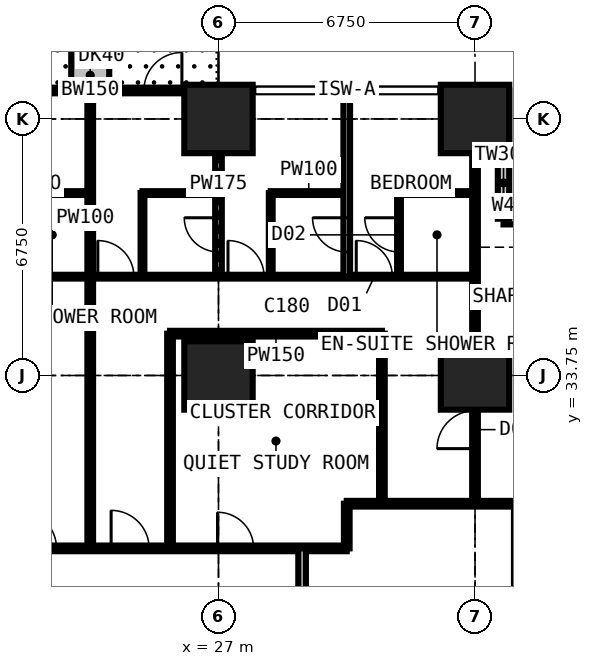
"""IFC4 building model, lengths in metres.
Left out: names, types, materials, properties, quantities, classifications, styles, units other than length and angle.
Written with IfcOpenShell. Run it as: python <this file> out.ifc"""

import sys

from ifc_helpers import new_model, si_unit, direction, frame, frame_2d, origin, origin_2d, place, context, subcontext, project, spatial, rectangle, extrude, element, fill, save


model = new_model("IFC4")
c1 = context("Model", 3, precision=1e-05, world=origin(), true_north=direction((0.0, 1.0)))
c2 = subcontext(c1, "Body", "Model", "MODEL_VIEW")
j1 = project(units=[si_unit("LENGTHUNIT", "METRE"), si_unit("PLANEANGLEUNIT", "RADIAN")], contexts=[c1])
p1 = place(None, origin())
s1 = spatial("IfcSite", under=j1, at=p1, CompositionType="ELEMENT")
p2 = place(p1, origin())
s2 = spatial("IfcBuilding", under=s1, at=p2, CompositionType="ELEMENT")
p3 = place(p2, frame((0.0, 0.0, 57.6)))
s3 = spatial("IfcBuildingStorey", under=s2, at=p3, CompositionType="ELEMENT", Elevation=57.6)
for number, where, z_axis, x_axis in (
    (1, (27.0, 33.75, 0.0), (0.0, 0.0, 1.0), (1.0, 0.0, 0.0)),
    (2, (27.0, 40.5, 0.0), (0.0, 0.0, 1.0), (1.0, 0.0, 0.0)),
    (3, (33.75, 33.75, 0.0), (0.0, 0.0, 1.0), (1.0, 0.0, 0.0)),
    (4, (33.75, 40.5, 0.0), (0.0, 0.0, 1.0), (1.0, 0.0, 0.0)),
):
    element("IfcColumn", number, at=place(p3, frame(where, z_axis=z_axis, x_axis=x_axis)), inside=s3, PredefinedType="COLUMN", context=c2, shape_type="SweptSolid", body=[
        extrude(rectangle(XDim=1.8, YDim=1.8, at=origin_2d()), origin(), (0.0, 0.0, 1.0), 3.6),
    ])
p4 = place(p3, frame((37.875, 37.875, 0.0), z_axis=(0.0, 0.0, 1.0), x_axis=(-1.0, 0.0, 0.0)))
e5 = element("IfcWall", 5, at=p4, inside=s3, PredefinedType="SOLIDWALL", context=c2, shape_type="SweptSolid", body=[
    extrude(rectangle(XDim=3.375, YDim=0.3, at=frame_2d((1.688, 0.0))), origin(), (0.0, 0.0, 1.0), 3.375),
])
p5 = place(p4, frame((0.788, 0.0, 0.6)))
e6 = element("IfcOpeningElement", 6, at=p5, cuts=e5, PredefinedType="OPENING", context=c2, shape_type="SweptSolid", body=[
    extrude(rectangle(XDim=1.8, YDim=2.1, at=frame_2d((0.9, 1.05))), frame((0.0, 0.16, 0.0), z_axis=(0.0, -1.0, 0.0), x_axis=(1.0, 0.0, 0.0)), (0.0, 0.0, 1.0), 0.32),
])
p6 = place(p3, frame((34.5, 37.875, 0.0), z_axis=(0.0, 0.0, 1.0), x_axis=(0.0, 1.0, 0.0)))
e7 = element("IfcWall", 7, at=p6, inside=s3, PredefinedType="SOLIDWALL", context=c2, shape_type="SweptSolid", body=[
    extrude(rectangle(XDim=3.375, YDim=0.3, at=frame_2d((1.688, 0.0))), origin(), (0.0, 0.0, 1.0), 3.375),
])
p7 = place(p6, frame((0.343, 0.0, 0.9)))
e8 = element("IfcOpeningElement", 8, at=p7, cuts=e7, PredefinedType="OPENING", context=c2, shape_type="SweptSolid", body=[
    extrude(rectangle(XDim=1.2, YDim=1.8, at=frame_2d((0.6, 0.9))), frame((0.0, 0.16, 0.0), z_axis=(0.0, -1.0, 0.0), x_axis=(1.0, 0.0, 0.0)), (0.0, 0.0, 1.0), 0.32),
])
p8 = place(p3, frame((20.25, 41.25, 0.0), z_axis=(0.0, 0.0, 1.0), x_axis=(1.0, 0.0, 0.0)))
e9 = element("IfcWall", 9, at=p8, inside=s3, PredefinedType="SOLIDWALL", context=c2, shape_type="SweptSolid", body=[
    extrude(rectangle(XDim=6.75, YDim=0.15, at=frame_2d((3.375, 0.0))), origin(), (0.0, 0.0, 1.0), 3.375),
])
p9 = place(p8, frame((0.962, 0.0, 0.0)))
e10 = element("IfcOpeningElement", 10, at=p9, cuts=e9, PredefinedType="OPENING", context=c2, shape_type="SweptSolid", body=[
    extrude(rectangle(XDim=1.0, YDim=2.2, at=frame_2d((0.5, 1.1))), frame((0.0, 0.085, 0.0), z_axis=(0.0, -1.0, 0.0), x_axis=(1.0, 0.0, 0.0)), (0.0, 0.0, 1.0), 0.17),
])
p10 = place(p8, frame((2.025, 0.0, 0.9)))
e11 = element("IfcOpeningElement", 11, at=p10, cuts=e9, PredefinedType="OPENING", context=c2, shape_type="SweptSolid", body=[
    extrude(rectangle(XDim=1.2, YDim=1.8, at=frame_2d((0.6, 0.9))), frame((0.0, 0.085, 0.0), z_axis=(0.0, -1.0, 0.0), x_axis=(1.0, 0.0, 0.0)), (0.0, 0.0, 1.0), 0.17),
])
p11 = place(p8, frame((4.788, 0.0, 0.0)))
e12 = element("IfcOpeningElement", 12, at=p11, cuts=e9, PredefinedType="OPENING", context=c2, shape_type="SweptSolid", body=[
    extrude(rectangle(XDim=1.0, YDim=2.2, at=frame_2d((0.5, 1.1))), frame((0.0, 0.085, 0.0), z_axis=(0.0, -1.0, 0.0), x_axis=(1.0, 0.0, 0.0)), (0.0, 0.0, 1.0), 0.17),
])
p12 = place(p8, frame((3.525, 0.0, 0.9)))
e13 = element("IfcOpeningElement", 13, at=p12, cuts=e9, PredefinedType="OPENING", context=c2, shape_type="SweptSolid", body=[
    extrude(rectangle(XDim=1.2, YDim=1.8, at=frame_2d((0.6, 0.9))), frame((0.0, 0.085, 0.0), z_axis=(0.0, -1.0, 0.0), x_axis=(1.0, 0.0, 0.0)), (0.0, 0.0, 1.0), 0.17),
])
p13 = place(p3, frame((23.625, 41.35, 0.0), z_axis=(0.0, 0.0, 1.0), x_axis=(0.0, 1.0, 0.0)))
e14 = element("IfcWall", 14, at=p13, inside=s3, PredefinedType="USERDEFINED", context=c2, shape_type="SweptSolid", body=[
    extrude(rectangle(XDim=2.2, YDim=1.0, at=frame_2d((1.1, 0.0))), origin(), (0.0, 0.0, 1.0), 0.9),
])
p14 = place(p3, frame((10.125, 36.35, 0.0), z_axis=(0.0, 0.0, 1.0), x_axis=(1.0, 0.0, 0.0)))
e15 = element("IfcWall", 15, at=p14, inside=s3, PredefinedType="PARTITIONING", context=c2, shape_type="SweptSolid", body=[
    extrude(rectangle(XDim=23.625, YDim=0.1, at=frame_2d((11.812, 0.0))), origin(), (0.0, 0.0, 1.0), 3.375),
])
p15 = place(p14, frame((20.5, 0.0, 0.0)))
e16 = element("IfcOpeningElement", 16, at=p15, cuts=e15, PredefinedType="OPENING", context=c2, shape_type="SweptSolid", body=[
    extrude(rectangle(XDim=0.95, YDim=2.2, at=frame_2d((0.475, 1.1))), frame((0.0, 0.06, 0.0), z_axis=(0.0, -1.0, 0.0), x_axis=(1.0, 0.0, 0.0)), (0.0, 0.0, 1.0), 0.12),
])
p16 = place(p14, frame((17.125, 0.0, 0.0)))
e17 = element("IfcOpeningElement", 17, at=p16, cuts=e15, PredefinedType="OPENING", context=c2, shape_type="SweptSolid", body=[
    extrude(rectangle(XDim=0.95, YDim=2.2, at=frame_2d((0.475, 1.1))), frame((0.0, 0.06, 0.0), z_axis=(0.0, -1.0, 0.0), x_axis=(1.0, 0.0, 0.0)), (0.0, 0.0, 1.0), 0.12),
])
p17 = place(p14, frame((13.7, 0.0, 0.0)))
e18 = element("IfcOpeningElement", 18, at=p17, cuts=e15, PredefinedType="OPENING", context=c2, shape_type="SweptSolid", body=[
    extrude(rectangle(XDim=0.95, YDim=2.2, at=frame_2d((0.475, 1.1))), frame((0.0, 0.06, 0.0), z_axis=(0.0, -1.0, 0.0), x_axis=(1.0, 0.0, 0.0)), (0.0, 0.0, 1.0), 0.12),
])
p18 = place(p14, frame((0.2, 0.0, 0.0)))
e19 = element("IfcOpeningElement", 19, at=p18, cuts=e15, PredefinedType="OPENING", context=c2, shape_type="SweptSolid", body=[
    extrude(rectangle(XDim=0.95, YDim=2.2, at=frame_2d((0.475, 1.1))), frame((0.0, 0.06, 0.0), z_axis=(0.0, -1.0, 0.0), x_axis=(1.0, 0.0, 0.0)), (0.0, 0.0, 1.0), 0.12),
])
p19 = place(p14, frame((3.625, 0.0, 0.0)))
e20 = element("IfcOpeningElement", 20, at=p19, cuts=e15, PredefinedType="OPENING", context=c2, shape_type="SweptSolid", body=[
    extrude(rectangle(XDim=0.95, YDim=2.2, at=frame_2d((0.475, 1.1))), frame((0.0, 0.06, 0.0), z_axis=(0.0, -1.0, 0.0), x_axis=(1.0, 0.0, 0.0)), (0.0, 0.0, 1.0), 0.12),
])
p20 = place(p14, frame((7.0, 0.0, 0.0)))
e21 = element("IfcOpeningElement", 21, at=p20, cuts=e15, PredefinedType="OPENING", context=c2, shape_type="SweptSolid", body=[
    extrude(rectangle(XDim=0.95, YDim=2.2, at=frame_2d((0.475, 1.1))), frame((0.0, 0.06, 0.0), z_axis=(0.0, -1.0, 0.0), x_axis=(1.0, 0.0, 0.0)), (0.0, 0.0, 1.0), 0.12),
])
p21 = place(p14, frame((10.375, 0.0, 0.0)))
e22 = element("IfcOpeningElement", 22, at=p21, cuts=e15, PredefinedType="OPENING", context=c2, shape_type="SweptSolid", body=[
    extrude(rectangle(XDim=0.95, YDim=2.2, at=frame_2d((0.475, 1.1))), frame((0.0, 0.06, 0.0), z_axis=(0.0, -1.0, 0.0), x_axis=(1.0, 0.0, 0.0)), (0.0, 0.0, 1.0), 0.12),
])
p22 = place(p3, frame((11.3, 29.2, 0.0), z_axis=(0.0, 0.0, 1.0), x_axis=(1.0, 0.0, 0.0)))
e23 = element("IfcWall", 23, at=p22, inside=s3, PredefinedType="PARTITIONING", context=c2, shape_type="SweptSolid", body=[
    extrude(rectangle(XDim=19.075, YDim=0.15, at=frame_2d((9.538, 0.0))), origin(), (0.0, 0.0, 1.0), 3.375),
])
p23 = place(p22, frame((12.875, 0.0, 0.0)))
e24 = element("IfcOpeningElement", 24, at=p23, cuts=e23, PredefinedType="OPENING", context=c2, shape_type="SweptSolid", body=[
    extrude(rectangle(XDim=1.0, YDim=2.2, at=frame_2d((0.5, 1.1))), frame((0.0, 0.085, 0.0), z_axis=(0.0, -1.0, 0.0), x_axis=(1.0, 0.0, 0.0)), (0.0, 0.0, 1.0), 0.17),
])
p24 = place(p22, frame((10.438, 0.0, 0.0)))
e25 = element("IfcOpeningElement", 25, at=p24, cuts=e23, PredefinedType="OPENING", context=c2, shape_type="SweptSolid", body=[
    extrude(rectangle(XDim=1.0, YDim=2.2, at=frame_2d((0.5, 1.1))), frame((0.0, 0.085, 0.0), z_axis=(0.0, -1.0, 0.0), x_axis=(1.0, 0.0, 0.0)), (0.0, 0.0, 1.0), 0.17),
])
p25 = place(p22, frame((15.675, 0.0, 0.0)))
e26 = element("IfcOpeningElement", 26, at=p25, cuts=e23, PredefinedType="OPENING", context=c2, shape_type="SweptSolid", body=[
    extrude(rectangle(XDim=0.95, YDim=2.2, at=frame_2d((0.475, 1.1))), frame((0.0, 0.085, 0.0), z_axis=(0.0, -1.0, 0.0), x_axis=(1.0, 0.0, 0.0)), (0.0, 0.0, 1.0), 0.17),
])
p26 = place(p3, frame((21.625, 38.55, 0.0), z_axis=(0.0, 0.0, 1.0), x_axis=(1.0, 0.0, 0.0)))
e27 = element("IfcWall", 27, at=p26, inside=s3, PredefinedType="PARTITIONING", context=c2, shape_type="SweptSolid", body=[
    extrude(rectangle(XDim=2.0, YDim=0.1, at=frame_2d((1.0, 0.0))), origin(), (0.0, 0.0, 1.0), 3.375),
])
p27 = place(p3, frame((23.625, 29.2, 0.0), z_axis=(0.0, 0.0, 1.0), x_axis=(0.0, 1.0, 0.0)))
e28 = element("IfcWall", 28, at=p27, inside=s3, PredefinedType="PARTITIONING", context=c2, shape_type="SweptSolid", body=[
    extrude(rectangle(XDim=12.034, YDim=0.15, at=frame_2d((6.017, 0.0))), origin(), (0.0, 0.0, 1.0), 3.375),
])
p28 = place(p3, frame((25.0, 36.35, 0.0), z_axis=(0.0, 0.0, 1.0), x_axis=(0.0, 1.0, 0.0)))
e29 = element("IfcWall", 29, at=p28, inside=s3, PredefinedType="PARTITIONING", context=c2, shape_type="SweptSolid", body=[
    extrude(rectangle(XDim=2.2, YDim=0.1, at=frame_2d((1.1, 0.0))), origin(), (0.0, 0.0, 1.0), 3.375),
])
p29 = place(p3, frame((25.0, 38.55, 0.0), z_axis=(0.0, 0.0, 1.0), x_axis=(1.0, 0.0, 0.0)))
e30 = element("IfcWall", 30, at=p29, inside=s3, PredefinedType="PARTITIONING", context=c2, shape_type="SweptSolid", body=[
    extrude(rectangle(XDim=2.0, YDim=0.1, at=frame_2d((1.0, 0.0))), origin(), (0.0, 0.0, 1.0), 3.375),
])
p30 = place(p3, frame((25.725, 29.2, 0.0), z_axis=(0.0, 0.0, 1.0), x_axis=(0.0, 1.0, 0.0)))
e31 = element("IfcWall", 31, at=p30, inside=s3, PredefinedType="PARTITIONING", context=c2, shape_type="SweptSolid", body=[
    extrude(rectangle(XDim=5.65, YDim=0.15, at=frame_2d((2.825, 0.0))), origin(), (0.0, 0.0, 1.0), 3.375),
])
p31 = place(p3, frame((25.725, 34.85, 0.0), z_axis=(0.0, 0.0, 1.0), x_axis=(1.0, 0.0, 0.0)))
e32 = element("IfcWall", 32, at=p31, inside=s3, PredefinedType="PARTITIONING", context=c2, shape_type="SweptSolid", body=[
    extrude(rectangle(XDim=5.575, YDim=0.15, at=frame_2d((2.788, 0.0))), origin(), (0.0, 0.0, 1.0), 3.375),
])
p32 = place(p3, frame((27.0, 36.35, 0.0), z_axis=(0.0, 0.0, 1.0), x_axis=(0.0, 1.0, 0.0)))
e33 = element("IfcWall", 33, at=p32, inside=s3, PredefinedType="PARTITIONING", context=c2, shape_type="SweptSolid", body=[
    extrude(rectangle(XDim=4.884, YDim=0.175, at=frame_2d((2.442, 0.0))), origin(), (0.0, 0.0, 1.0), 2.877),
])
p33 = place(p32, frame((0.65, 0.0, 0.0)))
e34 = element("IfcOpeningElement", 34, at=p33, cuts=e33, PredefinedType="OPENING", context=c2, shape_type="SweptSolid", body=[
    extrude(rectangle(XDim=0.9, YDim=2.2, at=frame_2d((0.45, 1.1))), frame((0.0, 0.097, 0.0), z_axis=(0.0, -1.0, 0.0), x_axis=(1.0, 0.0, 0.0)), (0.0, 0.0, 1.0), 0.195),
])
p34 = place(p3, frame((28.375, 36.35, 0.0), z_axis=(0.0, 0.0, 1.0), x_axis=(0.0, 1.0, 0.0)))
e35 = element("IfcWall", 35, at=p34, inside=s3, PredefinedType="PARTITIONING", context=c2, shape_type="SweptSolid", body=[
    extrude(rectangle(XDim=2.2, YDim=0.1, at=frame_2d((1.1, 0.0))), origin(), (0.0, 0.0, 1.0), 3.375),
])
p35 = place(p3, frame((28.375, 38.55, 0.0), z_axis=(0.0, 0.0, 1.0), x_axis=(1.0, 0.0, 0.0)))
e36 = element("IfcWall", 36, at=p35, inside=s3, PredefinedType="PARTITIONING", context=c2, shape_type="SweptSolid", body=[
    extrude(rectangle(XDim=2.0, YDim=0.1, at=frame_2d((1.0, 0.0))), origin(), (0.0, 0.0, 1.0), 3.375),
])
p36 = place(p3, frame((29.2, 11.3, 0.0), z_axis=(0.0, 0.0, 1.0), x_axis=(0.0, 1.0, 0.0)))
e37 = element("IfcWall", 37, at=p36, inside=s3, PredefinedType="PARTITIONING", context=c2, shape_type="SweptSolid", body=[
    extrude(rectangle(XDim=17.9, YDim=0.2, at=frame_2d((8.95, 0.0))), origin(), (0.0, 0.0, 1.0), 3.375),
])
p37 = place(p36, frame((8.35, 0.0, 0.0)))
e38 = element("IfcOpeningElement", 38, at=p37, cuts=e37, PredefinedType="OPENING", context=c2, shape_type="SweptSolid", body=[
    extrude(rectangle(XDim=1.2, YDim=2.2, at=frame_2d((0.6, 1.1))), frame((0.0, 0.11, 0.0), z_axis=(0.0, -1.0, 0.0), x_axis=(1.0, 0.0, 0.0)), (0.0, 0.0, 1.0), 0.22),
])
p38 = place(p3, frame((30.375, 29.2, 0.0), z_axis=(0.0, 0.0, 1.0), x_axis=(0.0, 1.0, 0.0)))
e39 = element("IfcWall", 39, at=p38, inside=s3, PredefinedType="PARTITIONING", context=c2, shape_type="SweptSolid", body=[
    extrude(rectangle(XDim=1.175, YDim=0.15, at=frame_2d((0.587, 0.0))), origin(), (0.0, 0.0, 1.0), 3.375),
])
p39 = place(p3, frame((30.375, 30.375, 0.0), z_axis=(0.0, 0.0, 1.0), x_axis=(1.0, 0.0, 0.0)))
e40 = element("IfcWall", 40, at=p39, inside=s3, PredefinedType="PARTITIONING", context=c2, shape_type="SweptSolid", body=[
    extrude(rectangle(XDim=10.859, YDim=0.15, at=frame_2d((5.429, 0.0))), origin(), (0.0, 0.0, 1.0), 3.375),
])
p40 = place(p3, frame((30.375, 36.35, 0.0), z_axis=(0.0, 0.0, 1.0), x_axis=(0.0, 1.0, 0.0)))
e41 = element("IfcWall", 41, at=p40, inside=s3, PredefinedType="PARTITIONING", context=c2, shape_type="SweptSolid", body=[
    extrude(rectangle(XDim=4.884, YDim=0.175, at=frame_2d((2.442, 0.0))), origin(), (0.0, 0.0, 1.0), 3.375),
])
p41 = place(p40, frame((0.65, 0.0, 0.0)))
e42 = element("IfcOpeningElement", 42, at=p41, cuts=e41, PredefinedType="OPENING", context=c2, shape_type="SweptSolid", body=[
    extrude(rectangle(XDim=0.9, YDim=2.2, at=frame_2d((0.45, 1.1))), frame((0.0, 0.097, 0.0), z_axis=(0.0, -1.0, 0.0), x_axis=(1.0, 0.0, 0.0)), (0.0, 0.0, 1.0), 0.195),
])
p42 = place(p3, frame((31.3, 30.375, 0.0), z_axis=(0.0, 0.0, 1.0), x_axis=(0.0, 1.0, 0.0)))
e43 = element("IfcWall", 43, at=p42, inside=s3, PredefinedType="PARTITIONING", context=c2, shape_type="SweptSolid", body=[
    extrude(rectangle(XDim=4.475, YDim=0.15, at=frame_2d((2.238, 0.0))), origin(), (0.0, 0.0, 1.0), 3.375),
])
p43 = place(p3, frame((31.75, 36.35, 0.0), z_axis=(0.0, 0.0, 1.0), x_axis=(0.0, 1.0, 0.0)))
e44 = element("IfcWall", 44, at=p43, inside=s3, PredefinedType="PARTITIONING", context=c2, shape_type="SweptSolid", body=[
    extrude(rectangle(XDim=2.2, YDim=0.1, at=frame_2d((1.1, 0.0))), origin(), (0.0, 0.0, 1.0), 3.375),
])
p44 = place(p43, frame((0.65, 0.0, 0.0)))
e45 = element("IfcOpeningElement", 45, at=p44, cuts=e44, PredefinedType="OPENING", context=c2, shape_type="SweptSolid", body=[
    extrude(rectangle(XDim=0.9, YDim=2.2, at=frame_2d((0.45, 1.1))), frame((0.0, 0.06, 0.0), z_axis=(0.0, -1.0, 0.0), x_axis=(1.0, 0.0, 0.0)), (0.0, 0.0, 1.0), 0.12),
])
p45 = place(p3, frame((31.75, 38.55, 0.0), z_axis=(0.0, 0.0, 1.0), x_axis=(1.0, 0.0, 0.0)))
e46 = element("IfcWall", 46, at=p45, inside=s3, PredefinedType="PARTITIONING", context=c2, shape_type="SweptSolid", body=[
    extrude(rectangle(XDim=2.0, YDim=0.1, at=frame_2d((1.0, 0.0))), origin(), (0.0, 0.0, 1.0), 3.375),
])
p46 = place(p3, frame((33.75, 30.375, 0.0), z_axis=(0.0, 0.0, 1.0), x_axis=(0.0, 1.0, 0.0)))
e47 = element("IfcWall", 47, at=p46, inside=s3, PredefinedType="PARTITIONING", context=c2, shape_type="SweptSolid", body=[
    extrude(rectangle(XDim=10.859, YDim=0.15, at=frame_2d((5.429, 0.0))), origin(), (0.0, 0.0, 1.0), 2.877),
])
p47 = place(p46, frame((1.45, 0.0, 0.0)))
e48 = element("IfcOpeningElement", 48, at=p47, cuts=e47, PredefinedType="OPENING", context=c2, shape_type="SweptSolid", body=[
    extrude(rectangle(XDim=1.0, YDim=2.2, at=frame_2d((0.5, 1.1))), frame((0.0, 0.085, 0.0), z_axis=(0.0, -1.0, 0.0), x_axis=(1.0, 0.0, 0.0)), (0.0, 0.0, 1.0), 0.17),
])
p48 = place(p7, origin())
e49 = element("IfcWindow", 49, at=p48, inside=s3, PartitioningType="SINGLE_PANEL", PredefinedType="WINDOW", context=c2, shape_type="SweptSolid", body=[
    extrude(rectangle(XDim=1.2, YDim=1.8, at=frame_2d((0.6, 0.9))), frame((0.0, 0.03, 0.0), z_axis=(0.0, -1.0, 0.0), x_axis=(1.0, 0.0, 0.0)), (0.0, 0.0, 1.0), 0.06),
])
fill(e8, e49)
p49 = place(p10, origin())
e50 = element("IfcWindow", 50, at=p49, inside=s3, PartitioningType="SINGLE_PANEL", PredefinedType="WINDOW", context=c2, shape_type="SweptSolid", body=[
    extrude(rectangle(XDim=1.2, YDim=1.8, at=frame_2d((0.6, 0.9))), frame((0.0, 0.03, 0.0), z_axis=(0.0, -1.0, 0.0), x_axis=(1.0, 0.0, 0.0)), (0.0, 0.0, 1.0), 0.06),
])
fill(e11, e50)
p50 = place(p11, origin())
e51 = element("IfcDoor", 51, at=p50, inside=s3, OperationType="SINGLE_SWING_RIGHT", PredefinedType="DOOR", context=c2, shape_type="SweptSolid", body=[
    extrude(rectangle(XDim=1.0, YDim=2.2, at=frame_2d((0.5, 1.1))), frame((0.0, 0.025, 0.0), z_axis=(0.0, -1.0, 0.0), x_axis=(1.0, 0.0, 0.0)), (0.0, 0.0, 1.0), 0.05),
])
fill(e12, e51)
p51 = place(p12, origin())
e52 = element("IfcWindow", 52, at=p51, inside=s3, PartitioningType="SINGLE_PANEL", PredefinedType="WINDOW", context=c2, shape_type="SweptSolid", body=[
    extrude(rectangle(XDim=1.2, YDim=1.8, at=frame_2d((0.6, 0.9))), frame((0.0, 0.03, 0.0), z_axis=(0.0, -1.0, 0.0), x_axis=(1.0, 0.0, 0.0)), (0.0, 0.0, 1.0), 0.06),
])
fill(e13, e52)
p52 = place(p47, origin())
e53 = element("IfcDoor", 53, at=p52, inside=s3, OperationType="SINGLE_SWING_LEFT", PredefinedType="DOOR", context=c2, shape_type="SweptSolid", body=[
    extrude(rectangle(XDim=1.0, YDim=2.2, at=frame_2d((0.5, 1.1))), frame((0.0, 0.025, 0.0), z_axis=(0.0, -1.0, 0.0), x_axis=(1.0, 0.0, 0.0)), (0.0, 0.0, 1.0), 0.05),
])
fill(e48, e53)
p53 = place(p15, origin())
e54 = element("IfcDoor", 54, at=p53, inside=s3, OperationType="SINGLE_SWING_LEFT", PredefinedType="DOOR", context=c2, shape_type="SweptSolid", body=[
    extrude(rectangle(XDim=0.95, YDim=2.2, at=frame_2d((0.475, 1.1))), frame((0.0, 0.025, 0.0), z_axis=(0.0, -1.0, 0.0), x_axis=(1.0, 0.0, 0.0)), (0.0, 0.0, 1.0), 0.05),
])
fill(e16, e54)
p54 = place(p44, origin())
e55 = element("IfcDoor", 55, at=p54, inside=s3, OperationType="SINGLE_SWING_RIGHT", PredefinedType="DOOR", context=c2, shape_type="SweptSolid", body=[
    extrude(rectangle(XDim=0.9, YDim=2.2, at=frame_2d((0.45, 1.1))), frame((0.0, 0.025, 0.0), z_axis=(0.0, -1.0, 0.0), x_axis=(1.0, 0.0, 0.0)), (0.0, 0.0, 1.0), 0.05),
])
fill(e45, e55)
p55 = place(p16, origin())
e56 = element("IfcDoor", 56, at=p55, inside=s3, OperationType="SINGLE_SWING_LEFT", PredefinedType="DOOR", context=c2, shape_type="SweptSolid", body=[
    extrude(rectangle(XDim=0.95, YDim=2.2, at=frame_2d((0.475, 1.1))), frame((0.0, 0.025, 0.0), z_axis=(0.0, -1.0, 0.0), x_axis=(1.0, 0.0, 0.0)), (0.0, 0.0, 1.0), 0.05),
])
fill(e17, e56)
p56 = place(p41, origin())
e57 = element("IfcDoor", 57, at=p56, inside=s3, OperationType="SINGLE_SWING_RIGHT", PredefinedType="DOOR", context=c2, shape_type="SweptSolid", body=[
    extrude(rectangle(XDim=0.9, YDim=2.2, at=frame_2d((0.45, 1.1))), frame((0.0, 0.025, 0.0), z_axis=(0.0, -1.0, 0.0), x_axis=(1.0, 0.0, 0.0)), (0.0, 0.0, 1.0), 0.05),
])
fill(e42, e57)
p57 = place(p17, origin())
e58 = element("IfcDoor", 58, at=p57, inside=s3, OperationType="SINGLE_SWING_LEFT", PredefinedType="DOOR", context=c2, shape_type="SweptSolid", body=[
    extrude(rectangle(XDim=0.95, YDim=2.2, at=frame_2d((0.475, 1.1))), frame((0.0, 0.025, 0.0), z_axis=(0.0, -1.0, 0.0), x_axis=(1.0, 0.0, 0.0)), (0.0, 0.0, 1.0), 0.05),
])
fill(e18, e58)
p58 = place(p33, origin())
e59 = element("IfcDoor", 59, at=p58, inside=s3, OperationType="SINGLE_SWING_RIGHT", PredefinedType="DOOR", context=c2, shape_type="SweptSolid", body=[
    extrude(rectangle(XDim=0.9, YDim=2.2, at=frame_2d((0.45, 1.1))), frame((0.0, 0.025, 0.0), z_axis=(0.0, -1.0, 0.0), x_axis=(1.0, 0.0, 0.0)), (0.0, 0.0, 1.0), 0.05),
])
fill(e34, e59)
p59 = place(p23, origin())
e60 = element("IfcDoor", 60, at=p59, inside=s3, OperationType="SINGLE_SWING_LEFT", PredefinedType="DOOR", context=c2, shape_type="SweptSolid", body=[
    extrude(rectangle(XDim=1.0, YDim=2.2, at=frame_2d((0.5, 1.1))), frame((0.0, 0.025, 0.0), z_axis=(0.0, -1.0, 0.0), x_axis=(1.0, 0.0, 0.0)), (0.0, 0.0, 1.0), 0.05),
])
fill(e24, e60)
p60 = place(p24, origin())
e61 = element("IfcDoor", 61, at=p60, inside=s3, OperationType="SINGLE_SWING_LEFT", PredefinedType="DOOR", context=c2, shape_type="SweptSolid", body=[
    extrude(rectangle(XDim=1.0, YDim=2.2, at=frame_2d((0.5, 1.1))), frame((0.0, 0.025, 0.0), z_axis=(0.0, -1.0, 0.0), x_axis=(1.0, 0.0, 0.0)), (0.0, 0.0, 1.0), 0.05),
])
fill(e25, e61)
p61 = place(p25, origin())
e62 = element("IfcDoor", 62, at=p61, inside=s3, OperationType="SINGLE_SWING_LEFT", PredefinedType="DOOR", context=c2, shape_type="SweptSolid", body=[
    extrude(rectangle(XDim=0.95, YDim=2.2, at=frame_2d((0.475, 1.1))), frame((0.0, 0.025, 0.0), z_axis=(0.0, -1.0, 0.0), x_axis=(1.0, 0.0, 0.0)), (0.0, 0.0, 1.0), 0.05),
])
fill(e26, e62)
save(model, sys.argv[1])
